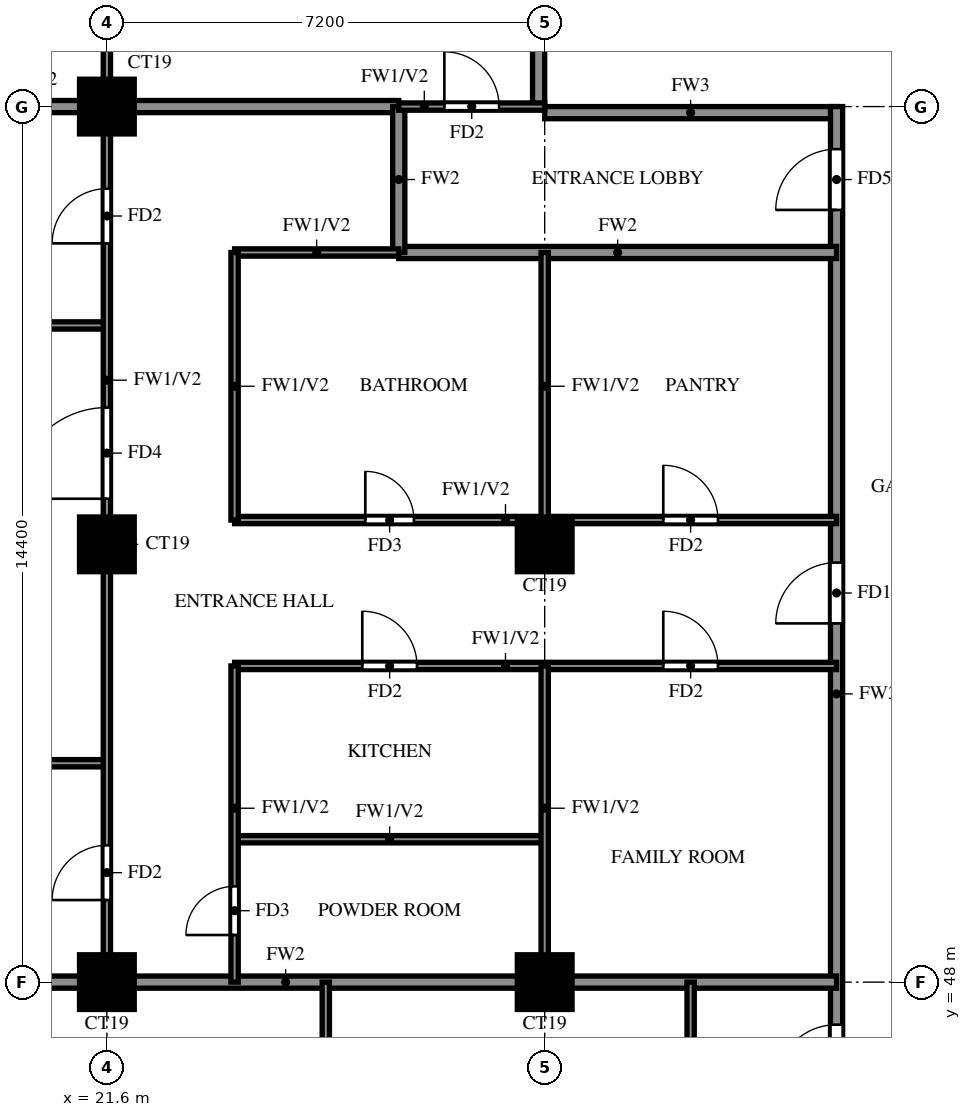
"""IFC4 building model, lengths in metres.
Left out: names, types, materials, properties, quantities, classifications, styles, units other than length and angle.
Written with IfcOpenShell. Run it as: python <this file> out.ifc"""

import sys

from ifc_helpers import new_model, si_unit, direction, frame, frame_2d, origin, origin_2d, place, context, subcontext, project, spatial, rectangle, extrude, source, transform, mapped, element, fill, save


model = new_model("IFC4")
c1 = context("Model", 3, precision=1e-05, world=origin(), true_north=direction((0.0, 1.0)))
c2 = subcontext(c1, "Body", "Model", "MODEL_VIEW")
j1 = project(units=[si_unit("LENGTHUNIT", "METRE"), si_unit("PLANEANGLEUNIT", "RADIAN")], contexts=[c1])
p1 = place(None, origin())
s1 = spatial("IfcSite", under=j1, at=p1, CompositionType="ELEMENT")
p2 = place(p1, origin())
s2 = spatial("IfcBuilding", under=s1, at=p2, CompositionType="ELEMENT")
p3 = place(p2, frame((0.0, 0.0, 195.5)))
s3 = spatial("IfcBuildingStorey", under=s2, at=p3, CompositionType="ELEMENT", Elevation=195.5)
m1 = source(origin(), c2, "Body", "SweptSolid", [
    extrude(rectangle(XDim=0.9, YDim=0.9, at=origin_2d()), origin(), (0.0, 0.0, 1.0), 3.2),
])
for number, where, z_axis, x_axis in (
    (1, (21.6, 48.0, 0.0), (0.0, 0.0, 1.0), (1.0, 0.0, 0.0)),
    (2, (28.8, 48.0, 0.0), (0.0, 0.0, 1.0), (1.0, 0.0, 0.0)),
    (3, (21.6, 55.2, 0.0), (0.0, 0.0, 1.0), (1.0, 0.0, 0.0)),
    (4, (28.8, 55.2, 0.0), (0.0, 0.0, 1.0), (1.0, 0.0, 0.0)),
    (5, (21.6, 62.4, 0.0), (0.0, 0.0, 1.0), (1.0, 0.0, 0.0)),
):
    element("IfcColumn", number, at=place(p3, frame(where, z_axis=z_axis, x_axis=x_axis)), inside=s3, PredefinedType="COLUMN", context=c2, shape_type="MappedRepresentation", body=[
        mapped(m1, transform((0.0, 0.0, 0.0))),
    ])
p4 = place(p3, frame((28.8, 62.3, 0.0), z_axis=(0.0, 0.0, 1.0), x_axis=(1.0, 0.0, 0.0)))
e6 = element("IfcWall", 6, at=p4, inside=s3, PredefinedType="SOLIDWALL", context=c2, shape_type="SweptSolid", body=[
    extrude(rectangle(XDim=4.8, YDim=0.2, at=frame_2d((2.4, 0.0))), origin(), (0.0, 0.0, 1.0), 3.2),
])
p5 = place(p3, frame((28.7, 62.4, 0.0), z_axis=(0.0, 0.0, 1.0), x_axis=(0.0, 1.0, 0.0)))
e7 = element("IfcWall", 7, at=p5, inside=s3, PredefinedType="SOLIDWALL", context=c2, shape_type="SweptSolid", body=[
    extrude(rectangle(XDim=15.6, YDim=0.2, at=frame_2d((7.8, 0.0))), origin(), (0.0, 0.0, 1.0), 3.2),
])
p6 = place(p3, frame((33.6, 45.6, 0.0), z_axis=(0.0, 0.0, 1.0), x_axis=(0.0, 1.0, 0.0)))
e8 = element("IfcWall", 8, at=p6, inside=s3, PredefinedType="SOLIDWALL", context=c2, shape_type="SweptSolid", body=[
    extrude(rectangle(XDim=16.8, YDim=0.2, at=frame_2d((8.4, 0.0))), origin(), (0.0, 0.0, 1.0), 3.2),
])
p7 = place(p6, frame((0.7, 0.0, 0.0)))
e9 = element("IfcOpeningElement", 9, at=p7, cuts=e8, PredefinedType="OPENING", context=c2, shape_type="SweptSolid", body=[
    extrude(rectangle(XDim=1.0, YDim=2.1, at=frame_2d((0.5, 1.05))), frame((0.0, 0.11, 0.0), z_axis=(0.0, -1.0, 0.0), x_axis=(1.0, 0.0, 0.0)), (0.0, 0.0, 1.0), 0.22),
])
p8 = place(p6, frame((8.3, 0.0, 0.0)))
e10 = element("IfcOpeningElement", 10, at=p8, cuts=e8, PredefinedType="OPENING", context=c2, shape_type="SweptSolid", body=[
    extrude(rectangle(XDim=1.0, YDim=2.1, at=frame_2d((0.5, 1.05))), frame((0.0, 0.11, 0.0), z_axis=(0.0, -1.0, 0.0), x_axis=(1.0, 0.0, 0.0)), (0.0, 0.0, 1.0), 0.22),
])
p9 = place(p6, frame((15.1, 0.0, 0.0)))
e11 = element("IfcOpeningElement", 11, at=p9, cuts=e8, PredefinedType="OPENING", context=c2, shape_type="SweptSolid", body=[
    extrude(rectangle(XDim=1.0, YDim=2.1, at=frame_2d((0.5, 1.05))), frame((0.0, 0.11, 0.0), z_axis=(0.0, -1.0, 0.0), x_axis=(1.0, 0.0, 0.0)), (0.0, 0.0, 1.0), 0.22),
])
p10 = place(p3, frame((14.525, 48.0, 0.0), z_axis=(0.0, 0.0, 1.0), x_axis=(1.0, 0.0, 0.0)))
e12 = element("IfcWall", 12, at=p10, inside=s3, PredefinedType="SOLIDWALL", context=c2, shape_type="SweptSolid", body=[
    extrude(rectangle(XDim=19.075, YDim=0.2, at=frame_2d((9.538, 0.0))), origin(), (0.0, 0.0, 1.0), 3.2),
])
p11 = place(p3, frame((26.4, 60.0, 0.0), z_axis=(0.0, 0.0, 1.0), x_axis=(1.0, 0.0, 0.0)))
e13 = element("IfcWall", 13, at=p11, inside=s3, PredefinedType="SOLIDWALL", context=c2, shape_type="SweptSolid", body=[
    extrude(rectangle(XDim=7.2, YDim=0.2, at=frame_2d((3.6, 0.0))), origin(), (0.0, 0.0, 1.0), 3.2),
])
p12 = place(p3, frame((14.525, 62.4, 0.0), z_axis=(0.0, 0.0, 1.0), x_axis=(1.0, 0.0, 0.0)))
e14 = element("IfcWall", 14, at=p12, inside=s3, PredefinedType="SOLIDWALL", context=c2, shape_type="SweptSolid", body=[
    extrude(rectangle(XDim=11.875, YDim=0.2, at=frame_2d((5.938, 0.0))), origin(), (0.0, 0.0, 1.0), 3.2),
])
p13 = place(p3, frame((26.4, 60.0, 0.0), z_axis=(0.0, 0.0, 1.0), x_axis=(0.0, 1.0, 0.0)))
e15 = element("IfcWall", 15, at=p13, inside=s3, PredefinedType="SOLIDWALL", context=c2, shape_type="SweptSolid", body=[
    extrude(rectangle(XDim=2.4, YDim=0.2, at=frame_2d((1.2, 0.0))), origin(), (0.0, 0.0, 1.0), 3.2),
])
p14 = place(p3, frame((23.7, 50.35, 0.0), z_axis=(0.0, 0.0, 1.0), x_axis=(1.0, 0.0, 0.0)))
e16 = element("IfcWall", 16, at=p14, inside=s3, PredefinedType="PARTITIONING", context=c2, shape_type="SweptSolid", body=[
    extrude(rectangle(XDim=5.1, YDim=0.12, at=frame_2d((2.55, 0.0))), origin(), (0.0, 0.0, 1.0), 3.2),
])
p15 = place(p3, frame((14.525, 51.6, 0.0), z_axis=(0.0, 0.0, 1.0), x_axis=(1.0, 0.0, 0.0)))
e17 = element("IfcWall", 17, at=p15, inside=s3, PredefinedType="PARTITIONING", context=c2, shape_type="SweptSolid", body=[
    extrude(rectangle(XDim=7.075, YDim=0.12, at=frame_2d((3.538, 0.0))), origin(), (0.0, 0.0, 1.0), 2.3),
])
p16 = place(p3, frame((23.7, 53.2, 0.0), z_axis=(0.0, 0.0, 1.0), x_axis=(1.0, 0.0, 0.0)))
e18 = element("IfcWall", 18, at=p16, inside=s3, PredefinedType="PARTITIONING", context=c2, shape_type="SweptSolid", body=[
    extrude(rectangle(XDim=9.9, YDim=0.12, at=frame_2d((4.95, 0.0))), origin(), (0.0, 0.0, 1.0), 3.2),
])
p17 = place(p16, frame((2.1, 0.0, 0.0)))
e19 = element("IfcOpeningElement", 19, at=p17, cuts=e18, PredefinedType="OPENING", context=c2, shape_type="SweptSolid", body=[
    extrude(rectangle(XDim=0.9, YDim=2.1, at=frame_2d((0.45, 1.05))), frame((0.0, 0.07, 0.0), z_axis=(0.0, -1.0, 0.0), x_axis=(1.0, 0.0, 0.0)), (0.0, 0.0, 1.0), 0.14),
])
p18 = place(p16, frame((7.05, 0.0, 0.0)))
e20 = element("IfcOpeningElement", 20, at=p18, cuts=e18, PredefinedType="OPENING", context=c2, shape_type="SweptSolid", body=[
    extrude(rectangle(XDim=0.9, YDim=2.1, at=frame_2d((0.45, 1.05))), frame((0.0, 0.07, 0.0), z_axis=(0.0, -1.0, 0.0), x_axis=(1.0, 0.0, 0.0)), (0.0, 0.0, 1.0), 0.14),
])
p19 = place(p3, frame((23.7, 55.6, 0.0), z_axis=(0.0, 0.0, 1.0), x_axis=(1.0, 0.0, 0.0)))
e21 = element("IfcWall", 21, at=p19, inside=s3, PredefinedType="PARTITIONING", context=c2, shape_type="SweptSolid", body=[
    extrude(rectangle(XDim=9.9, YDim=0.12, at=frame_2d((4.95, 0.0))), origin(), (0.0, 0.0, 1.0), 3.2),
])
p20 = place(p19, frame((2.15, 0.0, 0.0)))
e22 = element("IfcOpeningElement", 22, at=p20, cuts=e21, PredefinedType="OPENING", context=c2, shape_type="SweptSolid", body=[
    extrude(rectangle(XDim=0.8, YDim=2.1, at=frame_2d((0.4, 1.05))), frame((0.0, 0.07, 0.0), z_axis=(0.0, -1.0, 0.0), x_axis=(1.0, 0.0, 0.0)), (0.0, 0.0, 1.0), 0.14),
])
p21 = place(p19, frame((7.05, 0.0, 0.0)))
e23 = element("IfcOpeningElement", 23, at=p21, cuts=e21, PredefinedType="OPENING", context=c2, shape_type="SweptSolid", body=[
    extrude(rectangle(XDim=0.9, YDim=2.1, at=frame_2d((0.45, 1.05))), frame((0.0, 0.07, 0.0), z_axis=(0.0, -1.0, 0.0), x_axis=(1.0, 0.0, 0.0)), (0.0, 0.0, 1.0), 0.14),
])
p22 = place(p3, frame((14.525, 58.8, 0.0), z_axis=(0.0, 0.0, 1.0), x_axis=(1.0, 0.0, 0.0)))
e24 = element("IfcWall", 24, at=p22, inside=s3, PredefinedType="PARTITIONING", context=c2, shape_type="SweptSolid", body=[
    extrude(rectangle(XDim=7.075, YDim=0.12, at=frame_2d((3.538, 0.0))), origin(), (0.0, 0.0, 1.0), 2.3),
])
p23 = place(p3, frame((23.7, 60.0, 0.0), z_axis=(0.0, 0.0, 1.0), x_axis=(1.0, 0.0, 0.0)))
e25 = element("IfcWall", 25, at=p23, inside=s3, PredefinedType="PARTITIONING", context=c2, shape_type="SweptSolid", body=[
    extrude(rectangle(XDim=2.7, YDim=0.12, at=frame_2d((1.35, 0.0))), origin(), (0.0, 0.0, 1.0), 3.2),
])
p24 = place(p3, frame((26.4, 62.4, 0.0), z_axis=(0.0, 0.0, 1.0), x_axis=(1.0, 0.0, 0.0)))
e26 = element("IfcWall", 26, at=p24, inside=s3, PredefinedType="PARTITIONING", context=c2, shape_type="SweptSolid", body=[
    extrude(rectangle(XDim=2.4, YDim=0.12, at=frame_2d((1.2, 0.0))), origin(), (0.0, 0.0, 1.0), 3.2),
])
p25 = place(p24, frame((0.75, 0.0, 0.0)))
e27 = element("IfcOpeningElement", 27, at=p25, cuts=e26, PredefinedType="OPENING", context=c2, shape_type="SweptSolid", body=[
    extrude(rectangle(XDim=0.9, YDim=2.1, at=frame_2d((0.45, 1.05))), frame((0.0, 0.07, 0.0), z_axis=(0.0, -1.0, 0.0), x_axis=(1.0, 0.0, 0.0)), (0.0, 0.0, 1.0), 0.14),
])
p26 = place(p3, frame((21.6, 48.0, 0.0), z_axis=(0.0, 0.0, 1.0), x_axis=(0.0, 1.0, 0.0)))
e28 = element("IfcWall", 28, at=p26, inside=s3, PredefinedType="PARTITIONING", context=c2, shape_type="SweptSolid", body=[
    extrude(rectangle(XDim=18.0, YDim=0.12, at=frame_2d((9.0, 0.0))), origin(), (0.0, 0.0, 1.0), 3.2),
])
p27 = place(p26, frame((1.35, 0.0, 0.0)))
e29 = element("IfcOpeningElement", 29, at=p27, cuts=e28, PredefinedType="OPENING", context=c2, shape_type="SweptSolid", body=[
    extrude(rectangle(XDim=0.9, YDim=2.1, at=frame_2d((0.45, 1.05))), frame((0.0, 0.07, 0.0), z_axis=(0.0, -1.0, 0.0), x_axis=(1.0, 0.0, 0.0)), (0.0, 0.0, 1.0), 0.14),
])
p28 = place(p26, frame((7.95, 0.0, 0.0)))
e30 = element("IfcOpeningElement", 30, at=p28, cuts=e28, PredefinedType="OPENING", context=c2, shape_type="SweptSolid", body=[
    extrude(rectangle(XDim=1.5, YDim=2.1, at=frame_2d((0.75, 1.05))), frame((0.0, 0.07, 0.0), z_axis=(0.0, -1.0, 0.0), x_axis=(1.0, 0.0, 0.0)), (0.0, 0.0, 1.0), 0.14),
])
p29 = place(p26, frame((12.15, 0.0, 0.0)))
e31 = element("IfcOpeningElement", 31, at=p29, cuts=e28, PredefinedType="OPENING", context=c2, shape_type="SweptSolid", body=[
    extrude(rectangle(XDim=0.9, YDim=2.1, at=frame_2d((0.45, 1.05))), frame((0.0, 0.07, 0.0), z_axis=(0.0, -1.0, 0.0), x_axis=(1.0, 0.0, 0.0)), (0.0, 0.0, 1.0), 0.14),
])
p30 = place(p26, frame((15.75, 0.0, 0.0)))
e32 = element("IfcOpeningElement", 32, at=p30, cuts=e28, PredefinedType="OPENING", context=c2, shape_type="SweptSolid", body=[
    extrude(rectangle(XDim=0.9, YDim=2.1, at=frame_2d((0.45, 1.05))), frame((0.0, 0.07, 0.0), z_axis=(0.0, -1.0, 0.0), x_axis=(1.0, 0.0, 0.0)), (0.0, 0.0, 1.0), 0.14),
])
p31 = place(p3, frame((23.7, 48.0, 0.0), z_axis=(0.0, 0.0, 1.0), x_axis=(0.0, 1.0, 0.0)))
e33 = element("IfcWall", 33, at=p31, inside=s3, PredefinedType="PARTITIONING", context=c2, shape_type="SweptSolid", body=[
    extrude(rectangle(XDim=5.2, YDim=0.12, at=frame_2d((2.6, 0.0))), origin(), (0.0, 0.0, 1.0), 3.2),
])
p32 = place(p31, frame((0.775, 0.0, 0.0)))
e34 = element("IfcOpeningElement", 34, at=p32, cuts=e33, PredefinedType="OPENING", context=c2, shape_type="SweptSolid", body=[
    extrude(rectangle(XDim=0.8, YDim=2.1, at=frame_2d((0.4, 1.05))), frame((0.0, 0.07, 0.0), z_axis=(0.0, -1.0, 0.0), x_axis=(1.0, 0.0, 0.0)), (0.0, 0.0, 1.0), 0.14),
])
p33 = place(p3, frame((23.7, 55.6, 0.0), z_axis=(0.0, 0.0, 1.0), x_axis=(0.0, 1.0, 0.0)))
e35 = element("IfcWall", 35, at=p33, inside=s3, PredefinedType="PARTITIONING", context=c2, shape_type="SweptSolid", body=[
    extrude(rectangle(XDim=4.4, YDim=0.12, at=frame_2d((2.2, 0.0))), origin(), (0.0, 0.0, 1.0), 3.2),
])
p34 = place(p3, frame((25.2, 39.725, 0.0), z_axis=(0.0, 0.0, 1.0), x_axis=(0.0, 1.0, 0.0)))
e36 = element("IfcWall", 36, at=p34, inside=s3, PredefinedType="PARTITIONING", context=c2, shape_type="SweptSolid", body=[
    extrude(rectangle(XDim=8.275, YDim=0.12, at=frame_2d((4.137, 0.0))), origin(), (0.0, 0.0, 1.0), 3.2),
])
p35 = place(p34, frame((4.525, 0.0, 0.0)))
e37 = element("IfcOpeningElement", 37, at=p35, cuts=e36, PredefinedType="OPENING", context=c2, shape_type="SweptSolid", body=[
    extrude(rectangle(XDim=0.9, YDim=2.1, at=frame_2d((0.45, 1.05))), frame((0.0, 0.07, 0.0), z_axis=(0.0, -1.0, 0.0), x_axis=(1.0, 0.0, 0.0)), (0.0, 0.0, 1.0), 0.14),
])
p36 = place(p3, frame((28.8, 48.0, 0.0), z_axis=(0.0, 0.0, 1.0), x_axis=(0.0, 1.0, 0.0)))
e38 = element("IfcWall", 38, at=p36, inside=s3, PredefinedType="PARTITIONING", context=c2, shape_type="SweptSolid", body=[
    extrude(rectangle(XDim=5.2, YDim=0.12, at=frame_2d((2.6, 0.0))), origin(), (0.0, 0.0, 1.0), 3.2),
])
p37 = place(p3, frame((28.8, 55.6, 0.0), z_axis=(0.0, 0.0, 1.0), x_axis=(0.0, 1.0, 0.0)))
e39 = element("IfcWall", 39, at=p37, inside=s3, PredefinedType="PARTITIONING", context=c2, shape_type="SweptSolid", body=[
    extrude(rectangle(XDim=4.4, YDim=0.12, at=frame_2d((2.2, 0.0))), origin(), (0.0, 0.0, 1.0), 3.2),
])
p38 = place(p3, frame((31.2, 45.6, 0.0), z_axis=(0.0, 0.0, 1.0), x_axis=(0.0, 1.0, 0.0)))
e40 = element("IfcWall", 40, at=p38, inside=s3, PredefinedType="PARTITIONING", context=c2, shape_type="SweptSolid", body=[
    extrude(rectangle(XDim=2.4, YDim=0.12, at=frame_2d((1.2, 0.0))), origin(), (0.0, 0.0, 1.0), 3.2),
])
p39 = place(p7, origin())
e41 = element("IfcDoor", 41, at=p39, inside=s3, OperationType="SINGLE_SWING_LEFT", PredefinedType="DOOR", context=c2, shape_type="SweptSolid", body=[
    extrude(rectangle(XDim=1.0, YDim=2.1, at=frame_2d((0.5, 1.05))), frame((0.0, 0.025, 0.0), z_axis=(0.0, -1.0, 0.0), x_axis=(1.0, 0.0, 0.0)), (0.0, 0.0, 1.0), 0.05),
])
fill(e9, e41)
p40 = place(p8, origin())
e42 = element("IfcDoor", 42, at=p40, inside=s3, OperationType="SINGLE_SWING_LEFT", PredefinedType="DOOR", context=c2, shape_type="SweptSolid", body=[
    extrude(rectangle(XDim=1.0, YDim=2.1, at=frame_2d((0.5, 1.05))), frame((0.0, 0.025, 0.0), z_axis=(0.0, -1.0, 0.0), x_axis=(1.0, 0.0, 0.0)), (0.0, 0.0, 1.0), 0.05),
])
fill(e10, e42)
p41 = place(p27, origin())
e43 = element("IfcDoor", 43, at=p41, inside=s3, OperationType="SINGLE_SWING_LEFT", PredefinedType="DOOR", context=c2, shape_type="SweptSolid", body=[
    extrude(rectangle(XDim=0.9, YDim=2.1, at=frame_2d((0.45, 1.05))), frame((0.0, 0.025, 0.0), z_axis=(0.0, -1.0, 0.0), x_axis=(1.0, 0.0, 0.0)), (0.0, 0.0, 1.0), 0.05),
])
fill(e29, e43)
p42 = place(p28, origin())
e44 = element("IfcDoor", 44, at=p42, inside=s3, OperationType="SINGLE_SWING_LEFT", PredefinedType="DOOR", context=c2, shape_type="SweptSolid", body=[
    extrude(rectangle(XDim=1.5, YDim=2.1, at=frame_2d((0.75, 1.05))), frame((0.0, 0.025, 0.0), z_axis=(0.0, -1.0, 0.0), x_axis=(1.0, 0.0, 0.0)), (0.0, 0.0, 1.0), 0.05),
])
fill(e30, e44)
p43 = place(p29, origin())
e45 = element("IfcDoor", 45, at=p43, inside=s3, OperationType="SINGLE_SWING_LEFT", PredefinedType="DOOR", context=c2, shape_type="SweptSolid", body=[
    extrude(rectangle(XDim=0.9, YDim=2.1, at=frame_2d((0.45, 1.05))), frame((0.0, 0.025, 0.0), z_axis=(0.0, -1.0, 0.0), x_axis=(1.0, 0.0, 0.0)), (0.0, 0.0, 1.0), 0.05),
])
fill(e31, e45)
p44 = place(p32, origin())
e46 = element("IfcDoor", 46, at=p44, inside=s3, OperationType="SINGLE_SWING_LEFT", PredefinedType="DOOR", context=c2, shape_type="SweptSolid", body=[
    extrude(rectangle(XDim=0.8, YDim=2.1, at=frame_2d((0.4, 1.05))), frame((0.0, 0.025, 0.0), z_axis=(0.0, -1.0, 0.0), x_axis=(1.0, 0.0, 0.0)), (0.0, 0.0, 1.0), 0.05),
])
fill(e34, e46)
p45 = place(p17, origin())
e47 = element("IfcDoor", 47, at=p45, inside=s3, OperationType="SINGLE_SWING_RIGHT", PredefinedType="DOOR", context=c2, shape_type="SweptSolid", body=[
    extrude(rectangle(XDim=0.9, YDim=2.1, at=frame_2d((0.45, 1.05))), frame((0.0, 0.025, 0.0), z_axis=(0.0, -1.0, 0.0), x_axis=(1.0, 0.0, 0.0)), (0.0, 0.0, 1.0), 0.05),
])
fill(e19, e47)
p46 = place(p20, origin())
e48 = element("IfcDoor", 48, at=p46, inside=s3, OperationType="SINGLE_SWING_LEFT", PredefinedType="DOOR", context=c2, shape_type="SweptSolid", body=[
    extrude(rectangle(XDim=0.8, YDim=2.1, at=frame_2d((0.4, 1.05))), frame((0.0, 0.025, 0.0), z_axis=(0.0, -1.0, 0.0), x_axis=(1.0, 0.0, 0.0)), (0.0, 0.0, 1.0), 0.05),
])
fill(e22, e48)
p47 = place(p18, origin())
e49 = element("IfcDoor", 49, at=p47, inside=s3, OperationType="SINGLE_SWING_LEFT", PredefinedType="DOOR", context=c2, shape_type="SweptSolid", body=[
    extrude(rectangle(XDim=0.9, YDim=2.1, at=frame_2d((0.45, 1.05))), frame((0.0, 0.025, 0.0), z_axis=(0.0, -1.0, 0.0), x_axis=(1.0, 0.0, 0.0)), (0.0, 0.0, 1.0), 0.05),
])
fill(e20, e49)
p48 = place(p21, origin())
e50 = element("IfcDoor", 50, at=p48, inside=s3, OperationType="SINGLE_SWING_RIGHT", PredefinedType="DOOR", context=c2, shape_type="SweptSolid", body=[
    extrude(rectangle(XDim=0.9, YDim=2.1, at=frame_2d((0.45, 1.05))), frame((0.0, 0.025, 0.0), z_axis=(0.0, -1.0, 0.0), x_axis=(1.0, 0.0, 0.0)), (0.0, 0.0, 1.0), 0.05),
])
fill(e23, e50)
p49 = place(p25, origin())
e51 = element("IfcDoor", 51, at=p49, inside=s3, OperationType="SINGLE_SWING_RIGHT", PredefinedType="DOOR", context=c2, shape_type="SweptSolid", body=[
    extrude(rectangle(XDim=0.9, YDim=2.1, at=frame_2d((0.45, 1.05))), frame((0.0, 0.025, 0.0), z_axis=(0.0, -1.0, 0.0), x_axis=(1.0, 0.0, 0.0)), (0.0, 0.0, 1.0), 0.05),
])
fill(e27, e51)
p50 = place(p9, origin())
e52 = element("IfcDoor", 52, at=p50, inside=s3, OperationType="SINGLE_SWING_LEFT", PredefinedType="DOOR", context=c2, shape_type="SweptSolid", body=[
    extrude(rectangle(XDim=1.0, YDim=2.1, at=frame_2d((0.5, 1.05))), frame((0.0, 0.025, 0.0), z_axis=(0.0, -1.0, 0.0), x_axis=(1.0, 0.0, 0.0)), (0.0, 0.0, 1.0), 0.05),
])
fill(e11, e52)
save(model, sys.argv[1])
